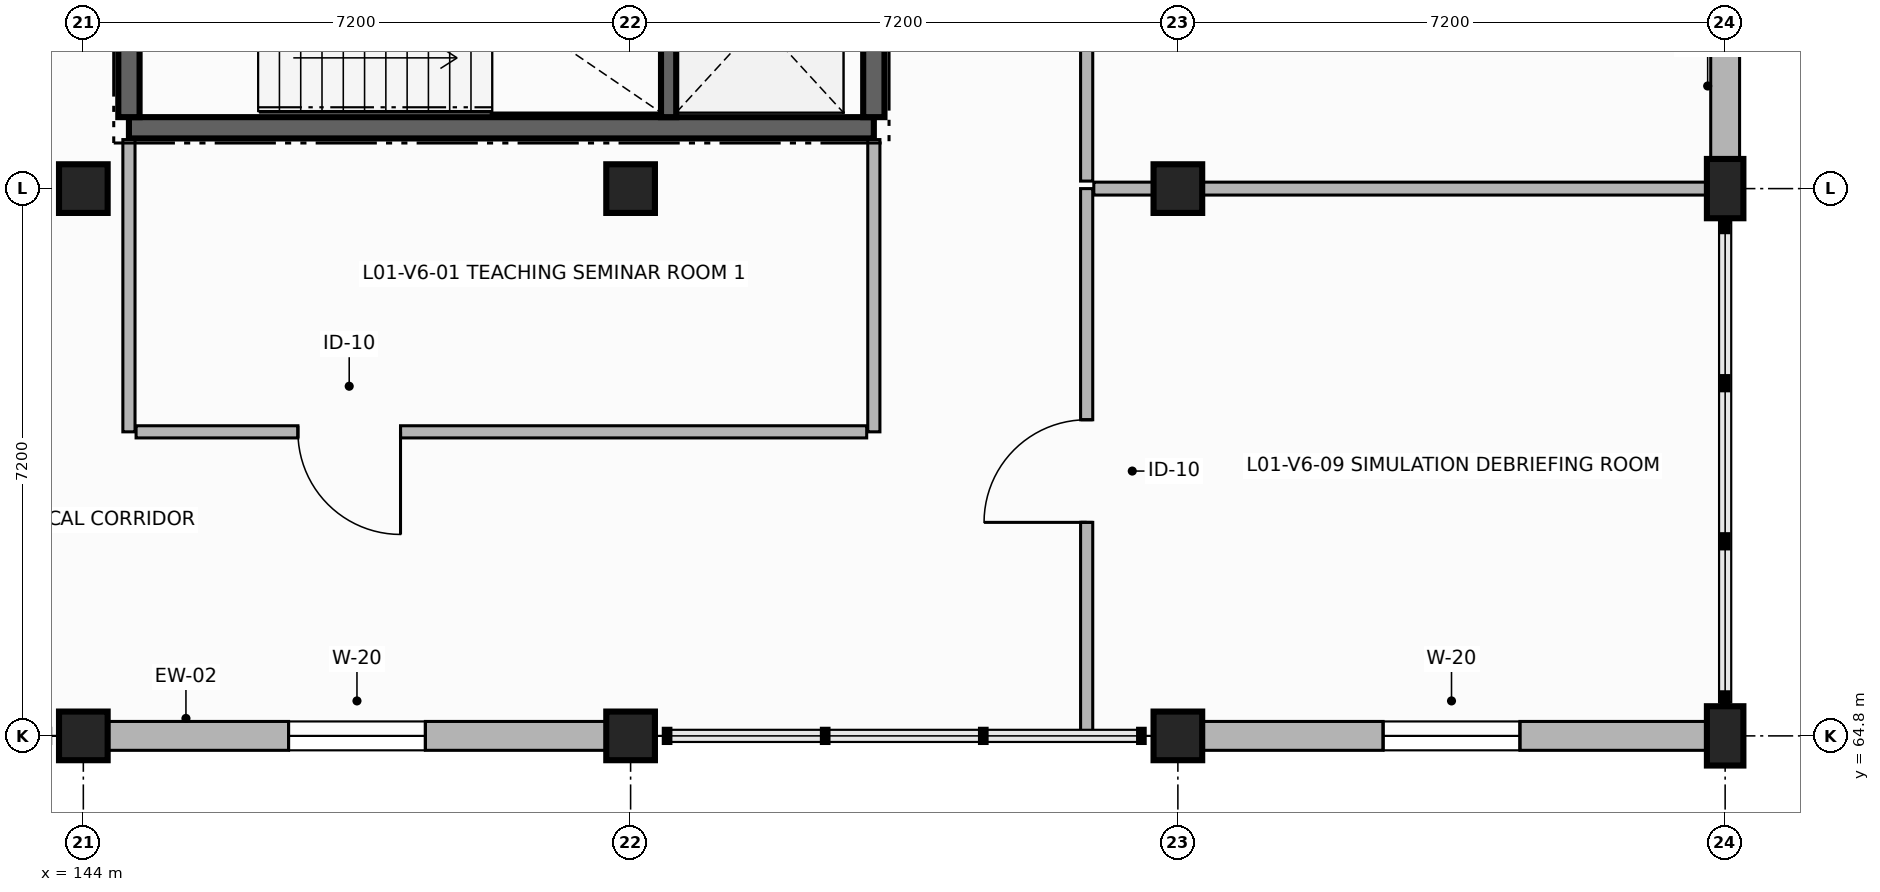
"""IFC4 building model, lengths in metres.
Left out: names, types, materials, properties, quantities, classifications, styles, units other than length and angle.
Written with IfcOpenShell. Run it as: python <this file> out.ifc"""

import sys

from ifc_helpers import new_model, si_unit, direction, frame, frame_2d, origin, origin_2d, place, context, subcontext, project, spatial, rectangle, extrude, element, fill, save


model = new_model("IFC4")
c1 = context("Model", 3, precision=1e-05, world=origin(), true_north=direction((0.0, 1.0)))
c2 = subcontext(c1, "Body", "Model", "MODEL_VIEW")
j1 = project(units=[si_unit("LENGTHUNIT", "METRE"), si_unit("PLANEANGLEUNIT", "RADIAN")], contexts=[c1])
p1 = place(None, origin())
s1 = spatial("IfcSite", under=j1, at=p1, CompositionType="ELEMENT")
p2 = place(p1, origin())
s2 = spatial("IfcBuilding", under=s1, at=p2, CompositionType="ELEMENT")
p3 = place(p2, frame((0.0, 0.0, 4.5)))
s3 = spatial("IfcBuildingStorey", under=s2, at=p3, CompositionType="ELEMENT", Elevation=4.5)
for number, where, z_axis, x_axis in (
    (1, (144.0, 64.8, 0.0), (0.0, 0.0, 1.0), (1.0, 0.0, 0.0)),
    (2, (144.0, 72.0, 0.0), (0.0, 0.0, 1.0), (1.0, 0.0, 0.0)),
    (3, (151.2, 64.8, 0.0), (0.0, 0.0, 1.0), (1.0, 0.0, 0.0)),
    (4, (151.2, 72.0, 0.0), (0.0, 0.0, 1.0), (1.0, 0.0, 0.0)),
    (5, (158.4, 64.8, 0.0), (0.0, 0.0, 1.0), (1.0, 0.0, 0.0)),
    (6, (158.4, 72.0, 0.0), (0.0, 0.0, 1.0), (1.0, 0.0, 0.0)),
):
    element("IfcColumn", number, at=place(p3, frame(where, z_axis=z_axis, x_axis=x_axis)), inside=s3, PredefinedType="COLUMN", context=c2, shape_type="SweptSolid", body=[
        extrude(rectangle(XDim=0.64, YDim=0.64, at=origin_2d()), origin(), (0.0, 0.0, 1.0), 3.58),
    ])
for number, where, z_axis, x_axis in (
    (7, (165.6, 64.8, 0.0), (0.0, 0.0, 1.0), (1.0, 0.0, 0.0)),
    (8, (165.6, 72.0, 0.0), (0.0, 0.0, 1.0), (1.0, 0.0, 0.0)),
):
    element("IfcColumn", number, at=place(p3, frame(where, z_axis=z_axis, x_axis=x_axis)), inside=s3, PredefinedType="PILASTER", context=c2, shape_type="SweptSolid", body=[
        extrude(rectangle(XDim=0.48, YDim=0.78, at=origin_2d()), origin(), (0.0, 0.0, 1.0), 3.58),
    ])
p4 = place(p3, frame((144.0, 64.8, 0.0), z_axis=(0.0, 0.0, 1.0), x_axis=(1.0, 0.0, 0.0)))
e9 = element("IfcWall", 9, at=p4, inside=s3, PredefinedType="SOLIDWALL", context=c2, shape_type="SweptSolid", body=[
    extrude(rectangle(XDim=7.2, YDim=0.38, at=frame_2d((3.6, 0.0))), origin(), (0.0, 0.0, 1.0), 2.91),
])
p5 = place(p4, frame((2.7, 0.0, 0.85)))
e10 = element("IfcOpeningElement", 10, at=p5, cuts=e9, PredefinedType="OPENING", context=c2, shape_type="SweptSolid", body=[
    extrude(rectangle(XDim=1.8, YDim=1.85, at=frame_2d((0.9, 0.925))), frame((0.0, 0.2, 0.0), z_axis=(0.0, -1.0, 0.0), x_axis=(1.0, 0.0, 0.0)), (0.0, 0.0, 1.0), 0.4),
])
p6 = place(p3, frame((158.4, 64.8, 0.0), z_axis=(0.0, 0.0, 1.0), x_axis=(1.0, 0.0, 0.0)))
e11 = element("IfcWall", 11, at=p6, inside=s3, PredefinedType="SOLIDWALL", context=c2, shape_type="SweptSolid", body=[
    extrude(rectangle(XDim=7.2, YDim=0.38, at=frame_2d((3.6, 0.0))), origin(), (0.0, 0.0, 1.0), 2.91),
])
p7 = place(p6, frame((2.7, 0.0, 0.85)))
e12 = element("IfcOpeningElement", 12, at=p7, cuts=e11, PredefinedType="OPENING", context=c2, shape_type="SweptSolid", body=[
    extrude(rectangle(XDim=1.8, YDim=1.85, at=frame_2d((0.9, 0.925))), frame((0.0, 0.2, 0.0), z_axis=(0.0, -1.0, 0.0), x_axis=(1.0, 0.0, 0.0)), (0.0, 0.0, 1.0), 0.4),
])
p8 = place(p3, frame((165.6, 72.0, 0.0), z_axis=(0.0, 0.0, 1.0), x_axis=(0.0, 1.0, 0.0)))
e13 = element("IfcWall", 13, at=p8, inside=s3, PredefinedType="SOLIDWALL", context=c2, shape_type="SweptSolid", body=[
    extrude(rectangle(XDim=7.2, YDim=0.38, at=frame_2d((3.6, 0.0))), origin(), (0.0, 0.0, 1.0), 2.91),
])
p9 = place(p8, frame((2.7, 0.0, 0.85)))
e14 = element("IfcOpeningElement", 14, at=p9, cuts=e13, PredefinedType="OPENING", context=c2, shape_type="SweptSolid", body=[
    extrude(rectangle(XDim=1.8, YDim=1.85, at=frame_2d((0.9, 0.925))), frame((0.0, 0.2, 0.0), z_axis=(0.0, -1.0, 0.0), x_axis=(1.0, 0.0, 0.0)), (0.0, 0.0, 1.0), 0.4),
])
p10 = place(p3, frame((144.6, 72.8, 0.0), z_axis=(0.0, 0.0, 1.0), x_axis=(1.0, 0.0, 0.0)))
e15 = element("IfcWall", 15, at=p10, inside=s3, PredefinedType="SHEAR", context=c2, shape_type="SweptSolid", body=[
    extrude(rectangle(XDim=9.8, YDim=0.28, at=frame_2d((4.9, 0.0))), origin(), (0.0, 0.0, 1.0), 3.58),
])
p11 = place(p3, frame((154.4, 72.94, 0.0), z_axis=(0.0, 0.0, 1.0), x_axis=(0.0, 1.0, 0.0)))
e16 = element("IfcWall", 16, at=p11, inside=s3, PredefinedType="SHEAR", context=c2, shape_type="SweptSolid", body=[
    extrude(rectangle(XDim=5.52, YDim=0.28, at=frame_2d((2.76, 0.0))), origin(), (0.0, 0.0, 1.0), 3.58),
])
p12 = place(p11, frame((4.05, 0.0, 0.0)))
e17 = element("IfcOpeningElement", 17, at=p12, cuts=e16, PredefinedType="OPENING", context=c2, shape_type="SweptSolid", body=[
    extrude(rectangle(XDim=1.15, YDim=2.2, at=frame_2d((0.575, 1.1))), frame((0.0, 0.15, 0.0), z_axis=(0.0, -1.0, 0.0), x_axis=(1.0, 0.0, 0.0)), (0.0, 0.0, 1.0), 0.3),
])
p13 = place(p3, frame((144.6, 78.46, 0.0), z_axis=(0.0, 0.0, 1.0), x_axis=(0.0, -1.0, 0.0)))
e18 = element("IfcWall", 18, at=p13, inside=s3, PredefinedType="SHEAR", context=c2, shape_type="SweptSolid", body=[
    extrude(rectangle(XDim=5.52, YDim=0.28, at=frame_2d((2.76, 0.0))), origin(), (0.0, 0.0, 1.0), 3.58),
])
p14 = place(p3, frame((151.7, 72.94, 0.0), z_axis=(0.0, 0.0, 1.0), x_axis=(0.0, 1.0, 0.0)))
e19 = element("IfcWall", 19, at=p14, inside=s3, PredefinedType="SHEAR", context=c2, shape_type="SweptSolid", body=[
    extrude(rectangle(XDim=3.66, YDim=0.2, at=frame_2d((1.83, 0.0))), origin(), (0.0, 0.0, 1.0), 3.58),
])
for number, where, z_axis, x_axis in (
    (20, (144.6, 68.8, 0.0), (0.0, 0.0, 1.0), (0.0, 1.0, 0.0)),
    (21, (154.4, 72.645, 0.0), (0.0, 0.0, 1.0), (0.0, -1.0, 0.0)),
):
    element("IfcWall", number, at=place(p3, frame(where, z_axis=z_axis, x_axis=x_axis)), inside=s3, PredefinedType="PARTITIONING", context=c2, shape_type="SweptSolid", body=[
        extrude(rectangle(XDim=3.845, YDim=0.16, at=frame_2d((1.922, 0.0))), origin(), (0.0, 0.0, 1.0), 2.89),
    ])
p15 = place(p3, frame((154.306, 68.8, 0.0), z_axis=(0.0, 0.0, 1.0), x_axis=(-1.0, 0.0, 0.0)))
e22 = element("IfcWall", 22, at=p15, inside=s3, PredefinedType="PARTITIONING", context=c2, shape_type="SweptSolid", body=[
    extrude(rectangle(XDim=9.612, YDim=0.16, at=frame_2d((4.806, 0.0))), origin(), (0.0, 0.0, 1.0), 2.89),
])
p16 = place(p15, frame((6.133, 0.0, 0.0)))
e23 = element("IfcOpeningElement", 23, at=p16, cuts=e22, PredefinedType="OPENING", context=c2, shape_type="SweptSolid", body=[
    extrude(rectangle(XDim=1.35, YDim=2.25, at=frame_2d((0.675, 1.125))), frame((0.0, 0.09, 0.0), z_axis=(0.0, -1.0, 0.0), x_axis=(1.0, 0.0, 0.0)), (0.0, 0.0, 1.0), 0.18),
])
p17 = place(p3, frame((157.2, 64.8, 0.0), z_axis=(0.0, 0.0, 1.0), x_axis=(0.0, 1.0, 0.0)))
e24 = element("IfcWall", 24, at=p17, inside=s3, PredefinedType="PARTITIONING", context=c2, shape_type="SweptSolid", body=[
    extrude(rectangle(XDim=7.2, YDim=0.16, at=frame_2d((3.6, 0.0))), origin(), (0.0, 0.0, 1.0), 2.89),
])
p18 = place(p17, frame((2.809, 0.0, 0.0)))
e25 = element("IfcOpeningElement", 25, at=p18, cuts=e24, PredefinedType="OPENING", context=c2, shape_type="SweptSolid", body=[
    extrude(rectangle(XDim=1.35, YDim=2.25, at=frame_2d((0.675, 1.125))), frame((0.0, 0.09, 0.0), z_axis=(0.0, -1.0, 0.0), x_axis=(1.0, 0.0, 0.0)), (0.0, 0.0, 1.0), 0.18),
])
p19 = place(p3, frame((157.294, 72.0, 0.0), z_axis=(0.0, 0.0, 1.0), x_axis=(1.0, 0.0, 0.0)))
e26 = element("IfcWall", 26, at=p19, inside=s3, PredefinedType="PARTITIONING", context=c2, shape_type="SweptSolid", body=[
    extrude(rectangle(XDim=8.101, YDim=0.17, at=frame_2d((4.051, 0.0))), origin(), (0.0, 0.0, 1.0), 2.89),
])
p20 = place(p3, frame((157.2, 72.099, 0.0), z_axis=(0.0, 0.0, 1.0), x_axis=(0.0, 1.0, 0.0)))
e27 = element("IfcWall", 27, at=p20, inside=s3, PredefinedType="PARTITIONING", context=c2, shape_type="SweptSolid", body=[
    extrude(rectangle(XDim=14.301, YDim=0.16, at=frame_2d((7.15, 0.0))), origin(), (0.0, 0.0, 1.0), 2.89),
])
p21 = place(p20, frame((10.175, 0.0, 0.0)))
e28 = element("IfcOpeningElement", 28, at=p21, cuts=e27, PredefinedType="OPENING", context=c2, shape_type="SweptSolid", body=[
    extrude(rectangle(XDim=0.98, YDim=2.15, at=frame_2d((0.49, 1.075))), frame((0.0, 0.09, 0.0), z_axis=(0.0, -1.0, 0.0), x_axis=(1.0, 0.0, 0.0)), (0.0, 0.0, 1.0), 0.18),
])
p22 = place(p5, origin())
e29 = element("IfcWindow", 29, at=p22, inside=s3, PartitioningType="SINGLE_PANEL", PredefinedType="WINDOW", context=c2, shape_type="SweptSolid", body=[
    extrude(rectangle(XDim=1.8, YDim=1.85, at=frame_2d((0.9, 0.925))), frame((0.0, 0.03, 0.0), z_axis=(0.0, -1.0, 0.0), x_axis=(1.0, 0.0, 0.0)), (0.0, 0.0, 1.0), 0.06),
])
fill(e10, e29)
p23 = place(p7, origin())
e30 = element("IfcWindow", 30, at=p23, inside=s3, PartitioningType="SINGLE_PANEL", PredefinedType="WINDOW", context=c2, shape_type="SweptSolid", body=[
    extrude(rectangle(XDim=1.8, YDim=1.85, at=frame_2d((0.9, 0.925))), frame((0.0, 0.03, 0.0), z_axis=(0.0, -1.0, 0.0), x_axis=(1.0, 0.0, 0.0)), (0.0, 0.0, 1.0), 0.06),
])
fill(e12, e30)
p24 = place(p16, origin())
e31 = element("IfcDoor", 31, at=p24, inside=s3, OperationType="SINGLE_SWING_LEFT", PredefinedType="DOOR", context=c2, shape_type="SweptSolid", body=[
    extrude(rectangle(XDim=1.35, YDim=2.25, at=frame_2d((0.675, 1.125))), frame((0.0, 0.025, 0.0), z_axis=(0.0, -1.0, 0.0), x_axis=(1.0, 0.0, 0.0)), (0.0, 0.0, 1.0), 0.05),
])
fill(e23, e31)
p25 = place(p18, origin())
e32 = element("IfcDoor", 32, at=p25, inside=s3, OperationType="SINGLE_SWING_LEFT", PredefinedType="DOOR", context=c2, shape_type="SweptSolid", body=[
    extrude(rectangle(XDim=1.35, YDim=2.25, at=frame_2d((0.675, 1.125))), frame((0.0, 0.025, 0.0), z_axis=(0.0, -1.0, 0.0), x_axis=(1.0, 0.0, 0.0)), (0.0, 0.0, 1.0), 0.05),
])
fill(e25, e32)
save(model, sys.argv[1])
